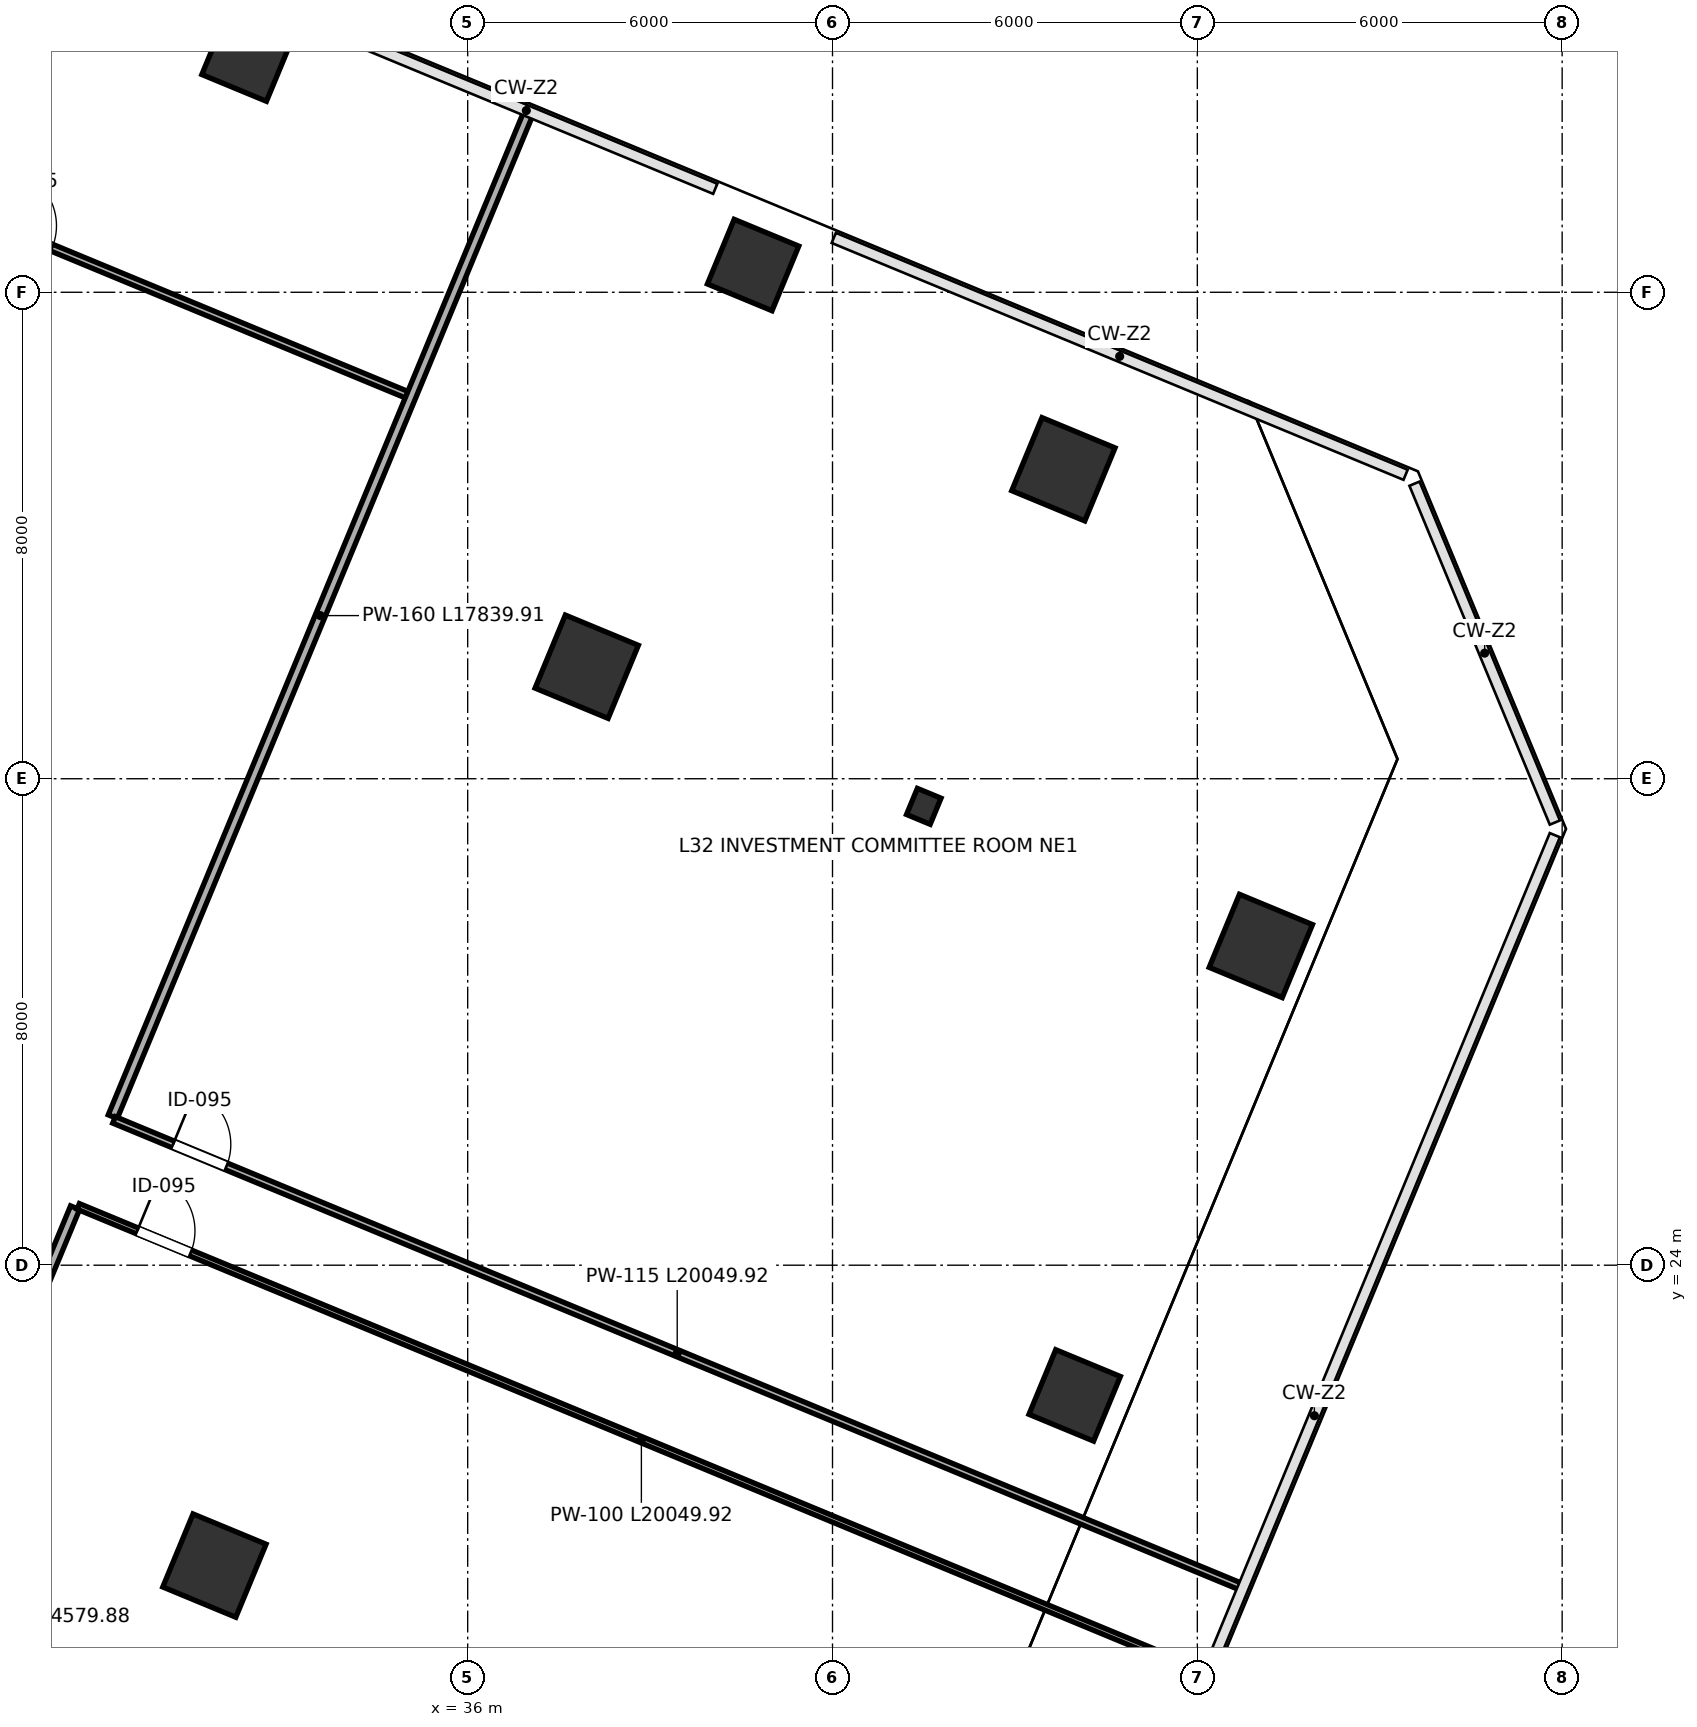
"""IFC4 building model, lengths in metres.
Left out: names, types, materials, properties, quantities, classifications, styles, units other than length and angle.
Written with IfcOpenShell. Run it as: python <this file> out.ifc"""

import sys

from ifc_helpers import new_model, si_unit, direction, frame, frame_2d, origin, origin_2d, place, context, subcontext, project, spatial, rectangle, i_section, extrude, clip, halfspace, source, transform, mapped, element, fill, save


model = new_model("IFC4")
c1 = context("Model", 3, precision=1e-05, world=origin(), true_north=direction((0.0, 1.0)))
c2 = subcontext(c1, "Body", "Model", "MODEL_VIEW")
j1 = project(units=[si_unit("LENGTHUNIT", "METRE"), si_unit("PLANEANGLEUNIT", "RADIAN")], contexts=[c1])
p1 = place(None, origin())
s1 = spatial("IfcSite", under=j1, at=p1, CompositionType="ELEMENT")
p2 = place(p1, origin())
s2 = spatial("IfcBuilding", under=s1, at=p2, CompositionType="ELEMENT")
p3 = place(p2, frame((0.0, 0.0, 145.6)))
s3 = spatial("IfcBuildingStorey", under=s2, at=p3, CompositionType="ELEMENT", Elevation=145.6)
p4 = place(p3, frame((32.379, 43.892, 0.0), z_axis=(0.060938866071, -0.056999851914, 0.996512654954), x_axis=(-0.909615982387, -0.414221107493, 0.031931781881)))
e1 = element("IfcColumn", 1, at=p4, inside=s3, PredefinedType="COLUMN", context=c2, shape_type="Clipping", body=[
    clip(clip(extrude(rectangle(XDim=1.15, YDim=1.15, at=origin_2d()), origin(), (0.0, 0.0, 1.0), 4.215), halfspace(frame((0.0, 0.0, 0.064), z_axis=(0.0, 0.0, -1.0), x_axis=(1.0, 0.0, 0.0)), False)), halfspace(frame((0.0, 0.0, 4.151), z_axis=(0.0, 0.0, 1.0), x_axis=(1.0, 0.0, 0.0)), False)),
])
p5 = place(p3, frame((31.835, 19.06, 0.0), z_axis=(-0.067529534187, -0.052761068305, 0.996321249238), x_axis=(-0.268358481598, 0.962760731488, 0.032794805374)))
e2 = element("IfcColumn", 2, at=p5, inside=s3, PredefinedType="COLUMN", context=c2, shape_type="Clipping", body=[
    clip(clip(extrude(rectangle(XDim=1.3, YDim=1.3, at=origin_2d()), origin(), (0.0, 0.0, 1.0), 4.216), halfspace(frame((0.0, 0.0, 0.074), z_axis=(0.0, 0.0, -1.0), x_axis=(1.0, 0.0, 0.0)), False)), halfspace(frame((0.0, 0.0, 4.142), z_axis=(0.0, 0.0, 1.0), x_axis=(1.0, 0.0, 0.0)), False)),
])
p6 = place(p3, frame((37.958, 33.842, 0.0), z_axis=(0.008571513109, -0.085251806052, 0.996322567609), x_axis=(-0.957387419586, 0.286939391301, 0.03278893926)))
e3 = element("IfcColumn", 3, at=p6, inside=s3, PredefinedType="COLUMN", context=c2, shape_type="Clipping", body=[
    clip(clip(extrude(rectangle(XDim=1.3, YDim=1.3, at=origin_2d()), origin(), (0.0, 0.0, 1.0), 4.215), halfspace(frame((0.0, 0.0, 0.074), z_axis=(0.0, 0.0, -1.0), x_axis=(1.0, 0.0, 0.0)), False)), halfspace(frame((0.0, 0.0, 4.142), z_axis=(0.0, 0.0, 1.0), x_axis=(1.0, 0.0, 0.0)), False)),
])
p7 = place(p3, frame((40.694, 40.448, 0.0), z_axis=(0.04253148249, -0.099625374746, 0.994115615864), x_axis=(-0.999057620474, -0.012862566611, 0.041453894311)))
e4 = element("IfcColumn", 4, at=p7, inside=s3, PredefinedType="COLUMN", context=c2, shape_type="Clipping", body=[
    clip(clip(extrude(rectangle(XDim=1.15, YDim=1.15, at=origin_2d()), origin(), (0.0, 0.0, 1.0), 4.225), halfspace(frame((0.0, 0.0, 0.083), z_axis=(0.0, 0.0, -1.0), x_axis=(1.0, 0.0, 0.0)), False)), halfspace(frame((0.0, 0.0, 4.142), z_axis=(0.0, 0.0, 1.0), x_axis=(1.0, 0.0, 0.0)), False)),
])
p8 = place(p3, frame((43.501, 31.546, 0.0), z_axis=(-0.003580716022, -0.1134855965, 0.993533189108), x_axis=(-0.911429557009, 0.409155473992, 0.043450669875)))
e5 = element("IfcColumn", 5, at=p8, inside=s3, PredefinedType="COLUMN", context=c2, shape_type="Clipping", body=[
    clip(clip(extrude(i_section(OverallWidth=0.421, OverallDepth=0.465, WebThickness=0.045, FlangeThickness=0.072, FilletRadius=0.015, at=origin_2d()), origin(), (0.0, 0.0, 1.0), 4.227), halfspace(frame((0.0, 0.0, 0.034), z_axis=(0.0, 0.0, -1.0), x_axis=(1.0, 0.0, 0.0)), False)), halfspace(frame((0.0, 0.0, 4.193), z_axis=(0.0, 0.0, 1.0), x_axis=(1.0, 0.0, 0.0)), False)),
])
p9 = place(p3, frame((45.797, 37.089, 0.0), z_axis=(0.024848043378, -0.12545091042, 0.991788608432), x_axis=(-0.980016275849, 0.192802781649, 0.0489406422)))
e6 = element("IfcColumn", 6, at=p9, inside=s3, PredefinedType="COLUMN", context=c2, shape_type="Clipping", body=[
    clip(clip(extrude(rectangle(XDim=1.3, YDim=1.3, at=origin_2d()), origin(), (0.0, 0.0, 1.0), 4.235), halfspace(frame((0.0, 0.0, 0.11), z_axis=(0.0, 0.0, -1.0), x_axis=(1.0, 0.0, 0.0)), False)), halfspace(frame((0.0, 0.0, 4.124), z_axis=(0.0, 0.0, 1.0), x_axis=(1.0, 0.0, 0.0)), False)),
])
p10 = place(p3, frame((45.983, 21.859, 0.0), z_axis=(-0.053555242606, -0.125422923006, 0.99065681564), x_axis=(-0.700788678564, 0.71145727681, 0.052189762124)))
e7 = element("IfcColumn", 7, at=p10, inside=s3, PredefinedType="COLUMN", context=c2, shape_type="Clipping", body=[
    clip(clip(extrude(rectangle(XDim=1.15, YDim=1.15, at=origin_2d()), origin(), (0.0, 0.0, 1.0), 4.24), halfspace(frame((0.0, 0.0, 0.104), z_axis=(0.0, 0.0, -1.0), x_axis=(1.0, 0.0, 0.0)), False)), halfspace(frame((0.0, 0.0, 4.135), z_axis=(0.0, 0.0, 1.0), x_axis=(1.0, 0.0, 0.0)), False)),
])
p11 = place(p3, frame((49.044, 29.25, 0.0), z_axis=(-0.015650186238, -0.141484588089, 0.989816742132), x_axis=(-0.876633710563, 0.478064761992, 0.054474038276)))
e8 = element("IfcColumn", 8, at=p11, inside=s3, PredefinedType="COLUMN", context=c2, shape_type="Clipping", body=[
    clip(clip(extrude(rectangle(XDim=1.3, YDim=1.3, at=origin_2d()), origin(), (0.0, 0.0, 1.0), 4.243), halfspace(frame((0.0, 0.0, 0.123), z_axis=(0.0, 0.0, -1.0), x_axis=(1.0, 0.0, 0.0)), False)), halfspace(frame((0.0, 0.0, 4.12), z_axis=(0.0, 0.0, 1.0), x_axis=(1.0, 0.0, 0.0)), False)),
])
p12 = place(p3, frame((9.523, 48.867, 0.0), z_axis=(0.0, 0.0, 1.0), x_axis=(0.923882225555, -0.382676930718, 0.0)))
e9 = element("IfcWall", 9, at=p12, inside=s3, PredefinedType="PARTITIONING", context=c2, shape_type="SweptSolid", body=[
    extrude(rectangle(XDim=27.61, YDim=0.115, at=frame_2d((13.805, 0.0))), origin(), (0.0, 0.0, 1.0), 3.96),
])
p13 = place(p12, frame((20.31, 0.0, 0.0)))
e10 = element("IfcOpeningElement", 10, at=p13, cuts=e9, PredefinedType="OPENING", context=c2, shape_type="SweptSolid", body=[
    extrude(rectangle(XDim=0.95, YDim=2.15, at=frame_2d((0.475, 1.075))), frame((0.0, 0.067, 0.0), z_axis=(0.0, -1.0, 0.0), x_axis=(1.0, 0.0, 0.0)), (0.0, 0.0, 1.0), 0.135),
])
p14 = place(p3, frame((30.162, 26.442, 0.0), z_axis=(0.0, 0.0, 1.0), x_axis=(0.382688600046, 0.923877391971, 0.0)))
e11 = element("IfcWall", 11, at=p14, inside=s3, PredefinedType="PARTITIONING", context=c2, shape_type="SweptSolid", body=[
    extrude(rectangle(XDim=17.84, YDim=0.16, at=frame_2d((8.92, 0.0))), origin(), (0.0, 0.0, 1.0), 3.195),
])
p15 = place(p3, frame((23.963, 11.475, 0.0), z_axis=(0.0, 0.0, 1.0), x_axis=(0.382686018031, 0.923878461489, 0.0)))
e12 = element("IfcWall", 12, at=p15, inside=s3, PredefinedType="PARTITIONING", context=c2, shape_type="SweptSolid", body=[
    extrude(rectangle(XDim=14.58, YDim=0.16, at=frame_2d((7.29, 0.0))), origin(), (0.0, 0.0, 1.0), 3.96),
])
p16 = place(p3, frame((30.184, 26.39, 0.0), z_axis=(0.0, 0.0, 1.0), x_axis=(0.923877920754, -0.382687323468, 0.0)))
e13 = element("IfcWall", 13, at=p16, inside=s3, PredefinedType="PARTITIONING", context=c2, shape_type="SweptSolid", body=[
    extrude(rectangle(XDim=20.05, YDim=0.115, at=frame_2d((10.025, 0.0))), origin(), (0.0, 0.0, 1.0), 3.252),
])
p17 = place(p16, frame((1.05, 0.0, 0.0)))
e14 = element("IfcOpeningElement", 14, at=p17, cuts=e13, PredefinedType="OPENING", context=c2, shape_type="SweptSolid", body=[
    extrude(rectangle(XDim=0.95, YDim=2.15, at=frame_2d((0.475, 1.075))), frame((0.0, 0.067, 0.0), z_axis=(0.0, -1.0, 0.0), x_axis=(1.0, 0.0, 0.0)), (0.0, 0.0, 1.0), 0.135),
])
p18 = place(p3, frame((29.595, 24.967, 0.0), z_axis=(0.0, 0.0, 1.0), x_axis=(0.923882225843, -0.382676930022, 0.0)))
e15 = element("IfcWall", 15, at=p18, inside=s3, PredefinedType="PARTITIONING", context=c2, shape_type="SweptSolid", body=[
    extrude(rectangle(XDim=20.05, YDim=0.1, at=frame_2d((10.025, 0.0))), origin(), (0.0, 0.0, 1.0), 3.252),
])
p19 = place(p18, frame((1.05, 0.0, 0.0)))
e16 = element("IfcOpeningElement", 16, at=p19, cuts=e15, PredefinedType="OPENING", context=c2, shape_type="SweptSolid", body=[
    extrude(rectangle(XDim=0.95, YDim=2.15, at=frame_2d((0.475, 1.075))), frame((0.0, 0.06, 0.0), z_axis=(0.0, -1.0, 0.0), x_axis=(1.0, 0.0, 0.0)), (0.0, 0.0, 1.0), 0.12),
])
m1 = source(origin(), c2, "Body", "SweptSolid", [
    extrude(rectangle(XDim=0.95, YDim=2.15, at=frame_2d((0.475, 1.075))), frame((0.0, 0.025, 0.0), z_axis=(0.0, -1.0, 0.0), x_axis=(1.0, 0.0, 0.0)), (0.0, 0.0, 1.0), 0.05),
])
p20 = place(p13, origin())
e17 = element("IfcDoor", 17, at=p20, inside=s3, OperationType="SINGLE_SWING_LEFT", PredefinedType="DOOR", context=c2, shape_type="MappedRepresentation", body=[
    mapped(m1, transform((0.0, 0.0, 0.0), scale=1.0)),
])
fill(e10, e17)
p21 = place(p17, origin())
e18 = element("IfcDoor", 18, at=p21, inside=s3, OperationType="SINGLE_SWING_LEFT", PredefinedType="DOOR", context=c2, shape_type="MappedRepresentation", body=[
    mapped(m1, transform((0.0, 0.0, 0.0), scale=1.0)),
])
fill(e14, e18)
p22 = place(p19, origin())
e19 = element("IfcDoor", 19, at=p22, inside=s3, OperationType="SINGLE_SWING_LEFT", PredefinedType="DOOR", context=c2, shape_type="MappedRepresentation", body=[
    mapped(m1, transform((0.0, 0.0, 0.0), scale=1.0)),
])
fill(e16, e19)
save(model, sys.argv[1])
